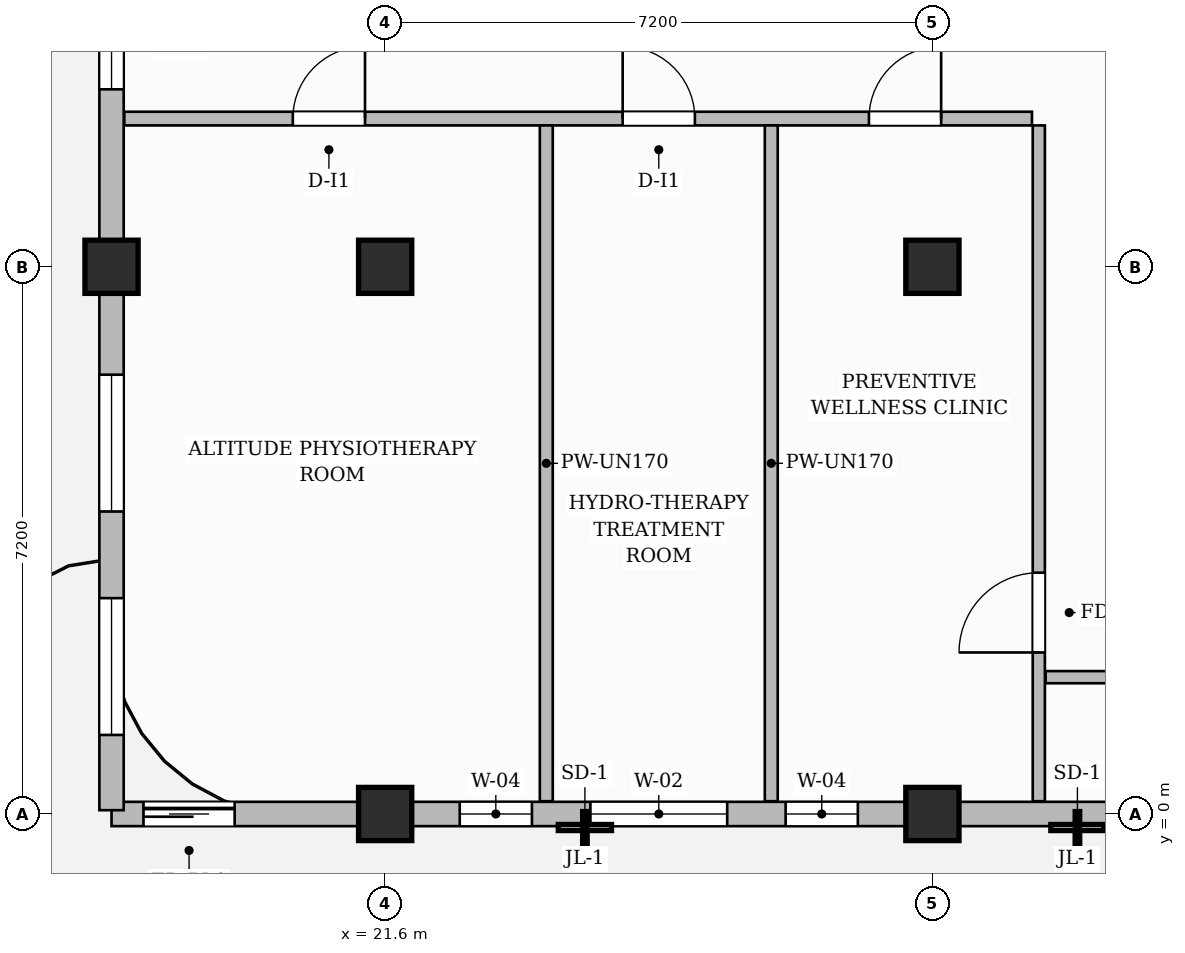
"""IFC4 building model, lengths in metres.
Left out: names, types, materials, properties, quantities, classifications, styles, units other than length and angle.
Written with IfcOpenShell. Run it as: python <this file> out.ifc"""

import sys

from ifc_helpers import new_model, si_unit, direction, frame, frame_2d, origin, origin_2d, place, context, subcontext, project, spatial, rectangle, extrude, source, transform, mapped, element, fill, save


model = new_model("IFC4")
c1 = context("Model", 3, precision=1e-05, world=origin(), true_north=direction((0.0, 1.0)))
c2 = subcontext(c1, "Body", "Model", "MODEL_VIEW")
j1 = project(units=[si_unit("LENGTHUNIT", "METRE"), si_unit("PLANEANGLEUNIT", "RADIAN")], contexts=[c1])
p1 = place(None, origin())
s1 = spatial("IfcSite", under=j1, at=p1, CompositionType="ELEMENT")
p2 = place(p1, origin())
s2 = spatial("IfcBuilding", under=s1, at=p2, CompositionType="ELEMENT")
p3 = place(p2, frame((0.0, 0.0, 286.6)))
s3 = spatial("IfcBuildingStorey", under=s2, at=p3, CompositionType="ELEMENT", Elevation=286.6)
m1 = source(origin(), c2, "Body", "SweptSolid", [
    extrude(rectangle(XDim=0.7, YDim=0.7, at=origin_2d()), origin(), (0.0, 0.0, 1.0), 3.85),
])
for number, where, z_axis, x_axis in (
    (1, (21.6, 0.0, 0.0), (0.0, 0.0, 1.0), (1.0, 0.0, 0.0)),
    (2, (21.6, 7.2, 0.0), (0.0, 0.0, 1.0), (1.0, 0.0, 0.0)),
    (3, (28.8, 0.0, 0.0), (0.0, 0.0, 1.0), (1.0, 0.0, 0.0)),
    (4, (28.8, 7.2, 0.0), (0.0, 0.0, 1.0), (1.0, 0.0, 0.0)),
    (5, (18.0, 7.2, 0.0), (0.0, 0.0, 1.0), (1.0, 0.0, 0.0)),
):
    element("IfcColumn", number, at=place(p3, frame(where, z_axis=z_axis, x_axis=x_axis)), inside=s3, PredefinedType="COLUMN", context=c2, shape_type="MappedRepresentation", body=[
        mapped(m1, transform((0.0, 0.0, 0.0), scale=1.0)),
    ])
p4 = place(p3, frame((18.168, 9.15, 0.0), z_axis=(0.0, 0.0, 1.0), x_axis=(1.0, 0.0, 0.0)))
e6 = element("IfcWall", 6, at=p4, inside=s3, PredefinedType="PARTITIONING", context=c2, shape_type="SweptSolid", body=[
    extrude(rectangle(XDim=11.942, YDim=0.18, at=frame_2d((5.971, 0.0))), origin(), (0.0, 0.0, 1.0), 3.6),
])
p5 = place(p4, frame((2.217, 0.0, 0.0)))
e7 = element("IfcOpeningElement", 7, at=p5, cuts=e6, PredefinedType="OPENING", context=c2, shape_type="SweptSolid", body=[
    extrude(rectangle(XDim=0.95, YDim=2.15, at=frame_2d((0.475, 1.075))), frame((0.0, 0.1, 0.0), z_axis=(0.0, -1.0, 0.0), x_axis=(1.0, 0.0, 0.0)), (0.0, 0.0, 1.0), 0.2),
])
p6 = place(p4, frame((6.557, 0.0, 0.0)))
e8 = element("IfcOpeningElement", 8, at=p6, cuts=e6, PredefinedType="OPENING", context=c2, shape_type="SweptSolid", body=[
    extrude(rectangle(XDim=0.95, YDim=2.15, at=frame_2d((0.475, 1.075))), frame((0.0, 0.1, 0.0), z_axis=(0.0, -1.0, 0.0), x_axis=(1.0, 0.0, 0.0)), (0.0, 0.0, 1.0), 0.2),
])
p7 = place(p4, frame((9.797, 0.0, 0.0)))
e9 = element("IfcOpeningElement", 9, at=p7, cuts=e6, PredefinedType="OPENING", context=c2, shape_type="SweptSolid", body=[
    extrude(rectangle(XDim=0.95, YDim=2.15, at=frame_2d((0.475, 1.075))), frame((0.0, 0.1, 0.0), z_axis=(0.0, -1.0, 0.0), x_axis=(1.0, 0.0, 0.0)), (0.0, 0.0, 1.0), 0.2),
])
p8 = place(p3, frame((30.2, 0.168, 0.0), z_axis=(0.0, 0.0, 1.0), x_axis=(0.0, 1.0, 0.0)))
e10 = element("IfcWall", 10, at=p8, inside=s3, PredefinedType="PARTITIONING", context=c2, shape_type="SweptSolid", body=[
    extrude(rectangle(XDim=8.892, YDim=0.16, at=frame_2d((4.446, 0.0))), origin(), (0.0, 0.0, 1.0), 3.6),
])
p9 = place(p8, frame((1.957, 0.0, 0.0)))
e11 = element("IfcOpeningElement", 11, at=p9, cuts=e10, PredefinedType="OPENING", context=c2, shape_type="SweptSolid", body=[
    extrude(rectangle(XDim=1.05, YDim=2.15, at=frame_2d((0.525, 1.075))), frame((0.0, 0.09, 0.0), z_axis=(0.0, -1.0, 0.0), x_axis=(1.0, 0.0, 0.0)), (0.0, 0.0, 1.0), 0.18),
])
p10 = place(p3, frame((30.29, 1.8, 0.0), z_axis=(0.0, 0.0, 1.0), x_axis=(1.0, 0.0, 0.0)))
e12 = element("IfcWall", 12, at=p10, inside=s3, PredefinedType="PARTITIONING", context=c2, shape_type="SweptSolid", body=[
    extrude(rectangle(XDim=19.37, YDim=0.16, at=frame_2d((9.685, 0.0))), origin(), (0.0, 0.0, 1.0), 3.6),
])
p11 = place(p10, frame((5.074, 0.0, 0.0)))
e13 = element("IfcOpeningElement", 13, at=p11, cuts=e12, PredefinedType="OPENING", context=c2, shape_type="SweptSolid", body=[
    extrude(rectangle(XDim=0.9, YDim=2.15, at=frame_2d((0.45, 1.075))), frame((0.0, 0.09, 0.0), z_axis=(0.0, -1.0, 0.0), x_axis=(1.0, 0.0, 0.0)), (0.0, 0.0, 1.0), 0.18),
])
p12 = place(p10, frame((14.06, 0.0, 0.0)))
e14 = element("IfcOpeningElement", 14, at=p12, cuts=e12, PredefinedType="OPENING", context=c2, shape_type="SweptSolid", body=[
    extrude(rectangle(XDim=0.9, YDim=2.15, at=frame_2d((0.45, 1.075))), frame((0.0, 0.09, 0.0), z_axis=(0.0, -1.0, 0.0), x_axis=(1.0, 0.0, 0.0)), (0.0, 0.0, 1.0), 0.18),
])
for number, where, z_axis, x_axis in (
    (15, (23.72, 0.168, 0.0), (0.0, 0.0, 1.0), (0.0, 1.0, 0.0)),
    (16, (26.68, 0.168, 0.0), (0.0, 0.0, 1.0), (0.0, 1.0, 0.0)),
):
    element("IfcWall", number, at=place(p3, frame(where, z_axis=z_axis, x_axis=x_axis)), inside=s3, PredefinedType="PARTITIONING", context=c2, shape_type="SweptSolid", body=[
        extrude(rectangle(XDim=8.892, YDim=0.17, at=frame_2d((4.446, 0.0))), origin(), (0.0, 0.0, 1.0), 3.6),
    ])
p13 = place(p3, frame((18.0, 0.0, 0.0), z_axis=(0.0, 0.0, 1.0), x_axis=(1.0, 0.0, 0.0)))
e17 = element("IfcWall", 17, at=p13, inside=s3, PredefinedType="SOLIDWALL", context=c2, shape_type="SweptSolid", body=[
    extrude(rectangle(XDim=31.8, YDim=0.32, at=frame_2d((15.9, 0.0))), origin(), (0.0, 0.0, 1.0), 3.185),
])
p14 = place(p13, frame((0.42, 0.0, 0.0)))
e18 = element("IfcOpeningElement", 18, at=p14, cuts=e17, PredefinedType="OPENING", context=c2, shape_type="SweptSolid", body=[
    extrude(rectangle(XDim=1.2, YDim=2.2, at=frame_2d((0.6, 1.1))), frame((0.0, 0.17, 0.0), z_axis=(0.0, -1.0, 0.0), x_axis=(1.0, 0.0, 0.0)), (0.0, 0.0, 1.0), 0.34),
])
p15 = place(p13, frame((4.581, 0.0, 0.8)))
e19 = element("IfcOpeningElement", 19, at=p15, cuts=e17, PredefinedType="OPENING", context=c2, shape_type="SweptSolid", body=[
    extrude(rectangle(XDim=0.95, YDim=1.75, at=frame_2d((0.475, 0.875))), frame((0.0, 0.17, 0.0), z_axis=(0.0, -1.0, 0.0), x_axis=(1.0, 0.0, 0.0)), (0.0, 0.0, 1.0), 0.34),
])
p16 = place(p13, frame((6.3, 0.0, 0.8)))
e20 = element("IfcOpeningElement", 20, at=p16, cuts=e17, PredefinedType="OPENING", context=c2, shape_type="SweptSolid", body=[
    extrude(rectangle(XDim=1.8, YDim=1.85, at=frame_2d((0.9, 0.925))), frame((0.0, 0.17, 0.0), z_axis=(0.0, -1.0, 0.0), x_axis=(1.0, 0.0, 0.0)), (0.0, 0.0, 1.0), 0.34),
])
p17 = place(p13, frame((8.869, 0.0, 0.8)))
e21 = element("IfcOpeningElement", 21, at=p17, cuts=e17, PredefinedType="OPENING", context=c2, shape_type="SweptSolid", body=[
    extrude(rectangle(XDim=0.95, YDim=1.75, at=frame_2d((0.475, 0.875))), frame((0.0, 0.17, 0.0), z_axis=(0.0, -1.0, 0.0), x_axis=(1.0, 0.0, 0.0)), (0.0, 0.0, 1.0), 0.34),
])
p18 = place(p13, frame((13.204, 0.0, 0.8)))
e22 = element("IfcOpeningElement", 22, at=p18, cuts=e17, PredefinedType="OPENING", context=c2, shape_type="SweptSolid", body=[
    extrude(rectangle(XDim=1.8, YDim=1.85, at=frame_2d((0.9, 0.925))), frame((0.0, 0.17, 0.0), z_axis=(0.0, -1.0, 0.0), x_axis=(1.0, 0.0, 0.0)), (0.0, 0.0, 1.0), 0.34),
])
p19 = place(p13, frame((18.796, 0.0, 0.8)))
e23 = element("IfcOpeningElement", 23, at=p19, cuts=e17, PredefinedType="OPENING", context=c2, shape_type="SweptSolid", body=[
    extrude(rectangle(XDim=1.8, YDim=1.85, at=frame_2d((0.9, 0.925))), frame((0.0, 0.17, 0.0), z_axis=(0.0, -1.0, 0.0), x_axis=(1.0, 0.0, 0.0)), (0.0, 0.0, 1.0), 0.34),
])
p20 = place(p13, frame((22.029, 0.0, 0.8)))
e24 = element("IfcOpeningElement", 24, at=p20, cuts=e17, PredefinedType="OPENING", context=c2, shape_type="SweptSolid", body=[
    extrude(rectangle(XDim=0.95, YDim=1.75, at=frame_2d((0.475, 0.875))), frame((0.0, 0.17, 0.0), z_axis=(0.0, -1.0, 0.0), x_axis=(1.0, 0.0, 0.0)), (0.0, 0.0, 1.0), 0.34),
])
p21 = place(p13, frame((25.475, 0.0, 0.8)))
e25 = element("IfcOpeningElement", 25, at=p21, cuts=e17, PredefinedType="OPENING", context=c2, shape_type="SweptSolid", body=[
    extrude(rectangle(XDim=1.8, YDim=1.85, at=frame_2d((0.9, 0.925))), frame((0.0, 0.17, 0.0), z_axis=(0.0, -1.0, 0.0), x_axis=(1.0, 0.0, 0.0)), (0.0, 0.0, 1.0), 0.34),
])
p22 = place(p13, frame((28.525, 0.0, 0.8)))
e26 = element("IfcOpeningElement", 26, at=p22, cuts=e17, PredefinedType="OPENING", context=c2, shape_type="SweptSolid", body=[
    extrude(rectangle(XDim=1.8, YDim=1.85, at=frame_2d((0.9, 0.925))), frame((0.0, 0.17, 0.0), z_axis=(0.0, -1.0, 0.0), x_axis=(1.0, 0.0, 0.0)), (0.0, 0.0, 1.0), 0.34),
])
p23 = place(p3, frame((18.0, 0.05, 0.0), z_axis=(0.0, 0.0, 1.0), x_axis=(0.0, 1.0, 0.0)))
e27 = element("IfcWall", 27, at=p23, inside=s3, PredefinedType="SOLIDWALL", context=c2, shape_type="SweptSolid", body=[
    extrude(rectangle(XDim=21.5, YDim=0.32, at=frame_2d((10.75, 0.0))), origin(), (0.0, 0.0, 1.0), 3.6),
])
p24 = place(p23, frame((0.99, 0.0, 0.8)))
e28 = element("IfcOpeningElement", 28, at=p24, cuts=e27, PredefinedType="OPENING", context=c2, shape_type="SweptSolid", body=[
    extrude(rectangle(XDim=1.8, YDim=1.85, at=frame_2d((0.9, 0.925))), frame((0.0, 0.17, 0.0), z_axis=(0.0, -1.0, 0.0), x_axis=(1.0, 0.0, 0.0)), (0.0, 0.0, 1.0), 0.34),
])
p25 = place(p23, frame((3.93, 0.0, 0.8)))
e29 = element("IfcOpeningElement", 29, at=p25, cuts=e27, PredefinedType="OPENING", context=c2, shape_type="SweptSolid", body=[
    extrude(rectangle(XDim=1.8, YDim=1.85, at=frame_2d((0.9, 0.925))), frame((0.0, 0.17, 0.0), z_axis=(0.0, -1.0, 0.0), x_axis=(1.0, 0.0, 0.0)), (0.0, 0.0, 1.0), 0.34),
])
p26 = place(p23, frame((9.485, 0.0, 0.8)))
e30 = element("IfcOpeningElement", 30, at=p26, cuts=e27, PredefinedType="OPENING", context=c2, shape_type="SweptSolid", body=[
    extrude(rectangle(XDim=1.15, YDim=1.8, at=frame_2d((0.575, 0.9))), frame((0.0, 0.17, 0.0), z_axis=(0.0, -1.0, 0.0), x_axis=(1.0, 0.0, 0.0)), (0.0, 0.0, 1.0), 0.34),
])
p27 = place(p23, frame((11.389, 0.0, 0.8)))
e31 = element("IfcOpeningElement", 31, at=p27, cuts=e27, PredefinedType="OPENING", context=c2, shape_type="SweptSolid", body=[
    extrude(rectangle(XDim=1.8, YDim=1.85, at=frame_2d((0.9, 0.925))), frame((0.0, 0.17, 0.0), z_axis=(0.0, -1.0, 0.0), x_axis=(1.0, 0.0, 0.0)), (0.0, 0.0, 1.0), 0.34),
])
p28 = place(p23, frame((15.77, 0.0, 0.8)))
e32 = element("IfcOpeningElement", 32, at=p28, cuts=e27, PredefinedType="OPENING", context=c2, shape_type="SweptSolid", body=[
    extrude(rectangle(XDim=1.8, YDim=1.85, at=frame_2d((0.9, 0.925))), frame((0.0, 0.17, 0.0), z_axis=(0.0, -1.0, 0.0), x_axis=(1.0, 0.0, 0.0)), (0.0, 0.0, 1.0), 0.34),
])
p29 = place(p23, frame((18.71, 0.0, 0.8)))
e33 = element("IfcOpeningElement", 33, at=p29, cuts=e27, PredefinedType="OPENING", context=c2, shape_type="SweptSolid", body=[
    extrude(rectangle(XDim=1.8, YDim=1.85, at=frame_2d((0.9, 0.925))), frame((0.0, 0.17, 0.0), z_axis=(0.0, -1.0, 0.0), x_axis=(1.0, 0.0, 0.0)), (0.0, 0.0, 1.0), 0.34),
])
m2 = source(origin(), c2, "Body", "SweptSolid", [
    extrude(rectangle(XDim=1.05, YDim=2.15, at=frame_2d((0.525, 1.075))), frame((0.0, 0.025, 0.0), z_axis=(0.0, -1.0, 0.0), x_axis=(1.0, 0.0, 0.0)), (0.0, 0.0, 1.0), 0.05),
])
p30 = place(p9, origin())
e34 = element("IfcDoor", 34, at=p30, inside=s3, OperationType="SINGLE_SWING_LEFT", PredefinedType="DOOR", context=c2, shape_type="MappedRepresentation", body=[
    mapped(m2, transform((0.0, 0.0, 0.0), scale=1.0)),
])
fill(e11, e34)
m3 = source(origin(), c2, "Body", "SweptSolid", [
    extrude(rectangle(XDim=0.95, YDim=2.15, at=frame_2d((0.475, 1.075))), frame((0.0, 0.025, 0.0), z_axis=(0.0, -1.0, 0.0), x_axis=(1.0, 0.0, 0.0)), (0.0, 0.0, 1.0), 0.05),
])
p31 = place(p5, origin())
e35 = element("IfcDoor", 35, at=p31, inside=s3, OperationType="SINGLE_SWING_RIGHT", PredefinedType="DOOR", context=c2, shape_type="MappedRepresentation", body=[
    mapped(m3, transform((0.0, 0.0, 0.0), scale=1.0)),
])
fill(e7, e35)
p32 = place(p6, origin())
e36 = element("IfcDoor", 36, at=p32, inside=s3, OperationType="SINGLE_SWING_LEFT", PredefinedType="DOOR", context=c2, shape_type="MappedRepresentation", body=[
    mapped(m3, transform((0.0, 0.0, 0.0), scale=1.0)),
])
fill(e8, e36)
p33 = place(p7, origin())
e37 = element("IfcDoor", 37, at=p33, inside=s3, OperationType="SINGLE_SWING_RIGHT", PredefinedType="DOOR", context=c2, shape_type="MappedRepresentation", body=[
    mapped(m3, transform((0.0, 0.0, 0.0), scale=1.0)),
])
fill(e9, e37)
m4 = source(origin(), c2, "Body", "SweptSolid", [
    extrude(rectangle(XDim=1.2, YDim=2.2, at=frame_2d((0.6, 1.1))), frame((0.0, 0.025, 0.0), z_axis=(0.0, -1.0, 0.0), x_axis=(1.0, 0.0, 0.0)), (0.0, 0.0, 1.0), 0.05),
])
p34 = place(p14, origin())
e38 = element("IfcDoor", 38, at=p34, inside=s3, OperationType="SLIDING_TO_LEFT", PredefinedType="DOOR", context=c2, shape_type="MappedRepresentation", body=[
    mapped(m4, transform((0.0, 0.0, 0.0), scale=1.0)),
])
fill(e18, e38)
m5 = source(origin(), c2, "Body", "SweptSolid", [
    extrude(rectangle(XDim=0.95, YDim=1.75, at=frame_2d((0.475, 0.875))), frame((0.0, 0.03, 0.0), z_axis=(0.0, -1.0, 0.0), x_axis=(1.0, 0.0, 0.0)), (0.0, 0.0, 1.0), 0.06),
])
p35 = place(p15, origin())
e39 = element("IfcWindow", 39, at=p35, inside=s3, PartitioningType="SINGLE_PANEL", PredefinedType="WINDOW", context=c2, shape_type="MappedRepresentation", body=[
    mapped(m5, transform((0.0, 0.0, 0.0), scale=1.0)),
])
fill(e19, e39)
m6 = source(origin(), c2, "Body", "SweptSolid", [
    extrude(rectangle(XDim=1.8, YDim=1.85, at=frame_2d((0.9, 0.925))), frame((0.0, 0.03, 0.0), z_axis=(0.0, -1.0, 0.0), x_axis=(1.0, 0.0, 0.0)), (0.0, 0.0, 1.0), 0.06),
])
p36 = place(p16, origin())
e40 = element("IfcWindow", 40, at=p36, inside=s3, PartitioningType="DOUBLE_PANEL_VERTICAL", PredefinedType="WINDOW", context=c2, shape_type="MappedRepresentation", body=[
    mapped(m6, transform((0.0, 0.0, 0.0), scale=1.0)),
])
fill(e20, e40)
p37 = place(p17, origin())
e41 = element("IfcWindow", 41, at=p37, inside=s3, PartitioningType="SINGLE_PANEL", PredefinedType="WINDOW", context=c2, shape_type="MappedRepresentation", body=[
    mapped(m5, transform((0.0, 0.0, 0.0), scale=1.0)),
])
fill(e21, e41)
p38 = place(p24, origin())
e42 = element("IfcWindow", 42, at=p38, inside=s3, PartitioningType="DOUBLE_PANEL_VERTICAL", PredefinedType="WINDOW", context=c2, shape_type="MappedRepresentation", body=[
    mapped(m6, transform((0.0, 0.0, 0.0), scale=1.0)),
])
fill(e28, e42)
p39 = place(p25, origin())
e43 = element("IfcWindow", 43, at=p39, inside=s3, PartitioningType="DOUBLE_PANEL_VERTICAL", PredefinedType="WINDOW", context=c2, shape_type="MappedRepresentation", body=[
    mapped(m6, transform((0.0, 0.0, 0.0), scale=1.0)),
])
fill(e29, e43)
m7 = source(origin(), c2, "Body", "SweptSolid", [
    extrude(rectangle(XDim=1.15, YDim=1.8, at=frame_2d((0.575, 0.9))), frame((0.0, 0.03, 0.0), z_axis=(0.0, -1.0, 0.0), x_axis=(1.0, 0.0, 0.0)), (0.0, 0.0, 1.0), 0.06),
])
p40 = place(p26, origin())
e44 = element("IfcWindow", 44, at=p40, inside=s3, PartitioningType="SINGLE_PANEL", PredefinedType="WINDOW", context=c2, shape_type="MappedRepresentation", body=[
    mapped(m7, transform((0.0, 0.0, 0.0), scale=1.0)),
])
fill(e30, e44)
save(model, sys.argv[1])
